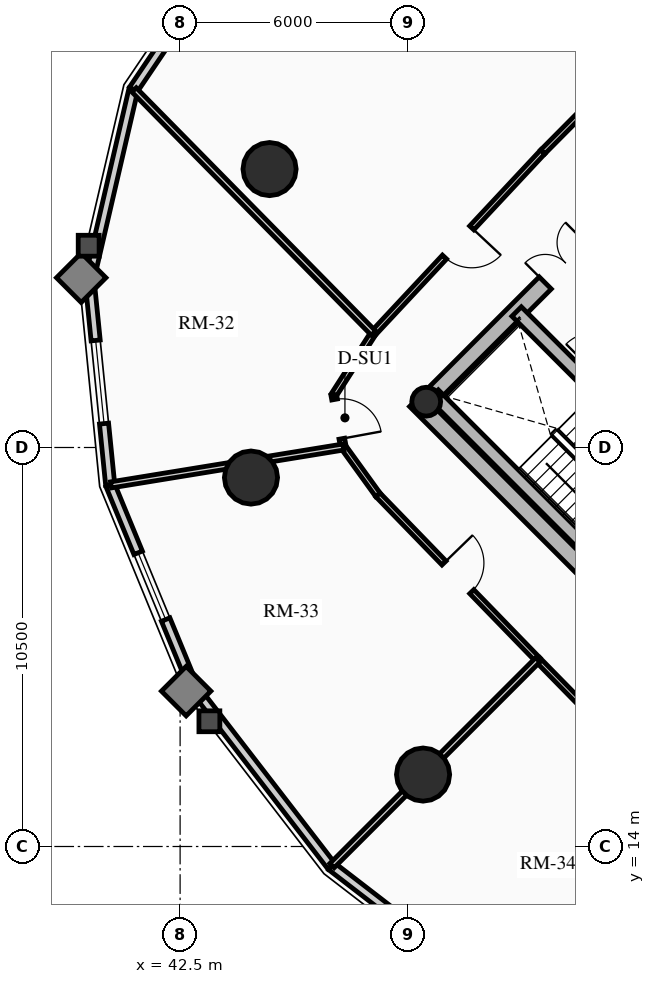
"""IFC4 building model, lengths in metres.
Left out: names, types, materials, properties, quantities, classifications, styles, units other than length and angle.
Written with IfcOpenShell. Run it as: python <this file> out.ifc"""

import sys

from ifc_helpers import new_model, si_unit, direction, frame, frame_2d, origin, origin_2d, place, context, subcontext, project, spatial, rectangle, circle, hollow_circle, extrude, source, transform, mapped, element, fill, save


model = new_model("IFC4")
c1 = context("Model", 3, precision=1e-05, world=origin(), true_north=direction((0.0, 1.0)))
c2 = subcontext(c1, "Body", "Model", "MODEL_VIEW")
j1 = project(units=[si_unit("LENGTHUNIT", "METRE"), si_unit("PLANEANGLEUNIT", "RADIAN")], contexts=[c1])
p1 = place(None, origin())
s1 = spatial("IfcSite", under=j1, at=p1, CompositionType="ELEMENT")
p2 = place(p1, origin())
s2 = spatial("IfcBuilding", under=s1, at=p2, CompositionType="ELEMENT")
p3 = place(p2, frame((0.0, 0.0, 84.7)))
s3 = spatial("IfcBuildingStorey", under=s2, at=p3, CompositionType="ELEMENT", Elevation=84.7)
p4 = place(p3, frame((58.737, 15.697, 0.0), z_axis=(0.0, 0.0, 1.0), x_axis=(-0.707106781187, 0.707106781187, 0.0)))
e1 = element("IfcWall", 1, at=p4, inside=s3, PredefinedType="SHEAR", context=c2, shape_type="SweptSolid", body=[
    extrude(rectangle(XDim=14.2, YDim=0.45, at=frame_2d((7.1, 0.0))), origin(), (0.0, 0.0, 1.0), 2.91),
])
p5 = place(p3, frame((48.856, 25.578, 0.0), z_axis=(0.0, 0.0, 1.0), x_axis=(0.707106781187, 0.707106781187, 0.0)))
e2 = element("IfcWall", 2, at=p5, inside=s3, PredefinedType="SHEAR", context=c2, shape_type="SweptSolid", body=[
    extrude(rectangle(XDim=10.7, YDim=0.45, at=frame_2d((5.35, 0.0))), origin(), (0.0, 0.0, 1.0), 2.91),
])
m1 = source(origin(), c2, "Body", "SweptSolid", [
    extrude(rectangle(XDim=1.5, YDim=2.02, at=frame_2d((0.75, 1.01))), frame((0.0, 0.235, 0.0), z_axis=(0.0, -1.0, 0.0), x_axis=(1.0, 0.0, 0.0)), (0.0, 0.0, 1.0), 0.47),
])
p6 = place(p5, frame((4.6, 0.0, 0.0)))
e3 = element("IfcOpeningElement", 3, at=p6, cuts=e2, PredefinedType="OPENING", context=c2, shape_type="MappedRepresentation", body=[
    mapped(m1, transform((0.0, 0.0, 0.0), x_axis=(1.0, 0.0, 0.0), y_axis=(0.0, 1.0, 0.0), z_axis=(0.0, 0.0, 1.0), scale=1.0)),
])
p7 = place(p3, frame((61.078, 18.355, 0.0), z_axis=(0.0, 0.0, 1.0), x_axis=(-0.707106781187, 0.707106781187, 0.0)))
e4 = element("IfcWall", 4, at=p7, inside=s3, PredefinedType="SHEAR", context=c2, shape_type="SweptSolid", body=[
    extrude(rectangle(XDim=13.75, YDim=0.35, at=frame_2d((6.875, 0.0))), origin(), (0.0, 0.0, 1.0), 2.91),
])
m2 = source(origin(), c2, "Body", "SweptSolid", [
    extrude(rectangle(XDim=1.1, YDim=2.015, at=frame_2d((0.55, 1.007))), frame((0.0, 0.185, 0.0), z_axis=(0.0, -1.0, 0.0), x_axis=(1.0, 0.0, 0.0)), (0.0, 0.0, 1.0), 0.37),
])
p8 = place(p7, frame((4.875, 0.0, 0.0)))
e5 = element("IfcOpeningElement", 5, at=p8, cuts=e4, PredefinedType="OPENING", context=c2, shape_type="MappedRepresentation", body=[
    mapped(m2, transform((0.0, 0.0, 0.0), x_axis=(1.0, 0.0, 0.0), y_axis=(0.0, 1.0, 0.0), z_axis=(0.0, 0.0, 1.0), scale=1.0)),
])
m3 = source(origin(), c2, "Body", "SweptSolid", [
    extrude(rectangle(XDim=1.15, YDim=2.02, at=frame_2d((0.575, 1.01))), frame((0.0, 0.185, 0.0), z_axis=(0.0, -1.0, 0.0), x_axis=(1.0, 0.0, 0.0)), (0.0, 0.0, 1.0), 0.37),
])
p9 = place(p7, frame((7.295, 0.0, 0.0)))
e6 = element("IfcOpeningElement", 6, at=p9, cuts=e4, PredefinedType="OPENING", context=c2, shape_type="MappedRepresentation", body=[
    mapped(m3, transform((0.0, 0.0, 0.0), x_axis=(1.0, 0.0, 0.0), y_axis=(0.0, 1.0, 0.0), z_axis=(0.0, 0.0, 1.0), scale=1.0)),
])
p10 = place(p3, frame((53.922, 21.141, 0.0), z_axis=(0.0, 0.0, 1.0), x_axis=(-0.707088616009, 0.707124945897, 0.0)))
e7 = element("IfcWall", 7, at=p10, inside=s3, PredefinedType="SHEAR", context=c2, shape_type="SweptSolid", body=[
    extrude(rectangle(XDim=6.72, YDim=0.35, at=frame_2d((3.36, 0.0))), origin(), (0.0, 0.0, 1.0), 2.91),
])
p11 = place(p3, frame((48.976, 25.706, 0.0), z_axis=(0.0, 0.0, 1.0), x_axis=(0.707106781187, 0.707106781187, 0.0)))
e8 = element("IfcColumn", 8, at=p11, inside=s3, PredefinedType="COLUMN", context=c2, shape_type="SweptSolid", body=[
    extrude(hollow_circle(Radius=0.38, WallThickness=0.032, at=origin_2d()), origin(), (0.0, 0.0, 1.0), 2.91),
])
for number, where, z_axis, x_axis in (
    (9, (44.854, 31.827, 0.0), (0.0, 0.0, 1.0), (1.0, 0.0, 0.0)),
    (10, (44.365, 23.709, 0.0), (0.0, 0.0, 1.0), (1.0, 0.0, 0.0)),
    (11, (48.893, 15.893, 0.0), (0.0, 0.0, 1.0), (1.0, 0.0, 0.0)),
):
    element("IfcColumn", number, at=place(p3, frame(where, z_axis=z_axis, x_axis=x_axis)), inside=s3, PredefinedType="USERDEFINED", context=c2, shape_type="SweptSolid", body=[
        extrude(circle(Radius=0.7, at=origin_2d()), origin(), (0.0, 0.0, 1.0), 2.91),
    ])
p12 = place(p3, frame((41.271, 33.92, 0.0), z_axis=(0.0, 0.0, 1.0), x_axis=(0.559572880421, 0.828781148131, 0.0)))
e12 = element("IfcWall", 12, at=p12, inside=s3, PredefinedType="SOLIDWALL", context=c2, shape_type="SweptSolid", body=[
    extrude(rectangle(XDim=4.905, YDim=0.24, at=frame_2d((2.452, 0.0))), origin(), (0.0, 0.0, 1.0), 2.179),
])
m4 = source(origin(), c2, "Body", "SweptSolid", [
    extrude(rectangle(XDim=1.9, YDim=1.35, at=frame_2d((0.95, 0.675))), frame((0.0, 0.13, 0.0), z_axis=(0.0, -1.0, 0.0), x_axis=(1.0, 0.0, 0.0)), (0.0, 0.0, 1.0), 0.26),
])
p13 = place(p12, frame((1.502, 0.0, 0.65)))
e13 = element("IfcOpeningElement", 13, at=p13, cuts=e12, PredefinedType="OPENING", context=c2, shape_type="MappedRepresentation", body=[
    mapped(m4, transform((0.0, 0.0, 0.0), x_axis=(1.0, 0.0, 0.0), y_axis=(0.0, 1.0, 0.0), z_axis=(0.0, 0.0, 1.0), scale=1.0)),
])
p14 = place(p3, frame((40.115, 28.933, 0.0), z_axis=(0.0, 0.0, 1.0), x_axis=(0.225834725257, 0.974165631126, 0.0)))
e14 = element("IfcWall", 14, at=p14, inside=s3, PredefinedType="SOLIDWALL", context=c2, shape_type="SweptSolid", body=[
    extrude(rectangle(XDim=5.119, YDim=0.24, at=frame_2d((2.56, 0.0))), origin(), (0.0, 0.0, 1.0), 2.179),
])
p15 = place(p3, frame((40.661, 23.513, 0.0), z_axis=(0.0, 0.0, 1.0), x_axis=(-0.10015591906, 0.994971754311, 0.0)))
e15 = element("IfcWall", 15, at=p15, inside=s3, PredefinedType="SOLIDWALL", context=c2, shape_type="SweptSolid", body=[
    extrude(rectangle(XDim=5.448, YDim=0.24, at=frame_2d((2.724, 0.0))), origin(), (0.0, 0.0, 1.0), 2.179),
])
m5 = source(origin(), c2, "Body", "SweptSolid", [
    extrude(rectangle(XDim=2.2, YDim=1.35, at=frame_2d((1.1, 0.675))), frame((0.0, 0.13, 0.0), z_axis=(0.0, -1.0, 0.0), x_axis=(1.0, 0.0, 0.0)), (0.0, 0.0, 1.0), 0.26),
])
p16 = place(p15, frame((1.624, 0.0, 0.65)))
e16 = element("IfcOpeningElement", 16, at=p16, cuts=e15, PredefinedType="OPENING", context=c2, shape_type="MappedRepresentation", body=[
    mapped(m5, transform((0.0, 0.0, 0.0), x_axis=(1.0, 0.0, 0.0), y_axis=(0.0, 1.0, 0.0), z_axis=(0.0, 0.0, 1.0), scale=1.0)),
])
p17 = place(p3, frame((42.855, 18.189, 0.0), z_axis=(0.0, 0.0, 1.0), x_axis=(-0.381027003055, 0.924563909604, 0.0)))
e17 = element("IfcWall", 17, at=p17, inside=s3, PredefinedType="SOLIDWALL", context=c2, shape_type="SweptSolid", body=[
    extrude(rectangle(XDim=5.758, YDim=0.24, at=frame_2d((2.879, 0.0))), origin(), (0.0, 0.0, 1.0), 2.179),
])
p18 = place(p17, frame((1.929, 0.0, 0.65)))
e18 = element("IfcOpeningElement", 18, at=p18, cuts=e17, PredefinedType="OPENING", context=c2, shape_type="MappedRepresentation", body=[
    mapped(m4, transform((0.0, 0.0, 0.0), x_axis=(1.0, 0.0, 0.0), y_axis=(0.0, 1.0, 0.0), z_axis=(0.0, 0.0, 1.0), scale=1.0)),
])
p19 = place(p3, frame((46.483, 13.483, 0.0), z_axis=(0.0, 0.0, 1.0), x_axis=(-0.61054437102, 0.791982052206, 0.0)))
e19 = element("IfcWall", 19, at=p19, inside=s3, PredefinedType="SOLIDWALL", context=c2, shape_type="SweptSolid", body=[
    extrude(rectangle(XDim=5.942, YDim=0.24, at=frame_2d((2.971, 0.0))), origin(), (0.0, 0.0, 1.0), 2.179),
])
p20 = place(p3, frame((51.189, 9.855, 0.0), z_axis=(0.0, 0.0, 1.0), x_axis=(-0.791982052206, 0.61054437102, 0.0)))
e20 = element("IfcWall", 20, at=p20, inside=s3, PredefinedType="SOLIDWALL", context=c2, shape_type="SweptSolid", body=[
    extrude(rectangle(XDim=5.942, YDim=0.24, at=frame_2d((2.971, 0.0))), origin(), (0.0, 0.0, 1.0), 2.179),
])
p21 = place(p20, frame((1.871, 0.0, 0.65)))
e21 = element("IfcOpeningElement", 21, at=p21, cuts=e20, PredefinedType="OPENING", context=c2, shape_type="MappedRepresentation", body=[
    mapped(m5, transform((0.0, 0.0, 0.0), x_axis=(1.0, 0.0, 0.0), y_axis=(0.0, 1.0, 0.0), z_axis=(0.0, 0.0, 1.0), scale=1.0)),
])
p22 = place(p3, frame((54.427, 34.683, 0.0), z_axis=(0.0, 0.0, 1.0), x_axis=(-0.704178989986, -0.710022499687, 0.0)))
e22 = element("IfcWall", 22, at=p22, inside=s3, PredefinedType="PARTITIONING", context=c2, shape_type="SweptSolid", body=[
    extrude(rectangle(XDim=3.384, YDim=0.15, at=frame_2d((1.692, 0.0))), origin(), (0.0, 0.0, 1.0), 2.225),
])
p23 = place(p3, frame((52.043, 32.28, 0.0), z_axis=(0.0, 0.0, 1.0), x_axis=(-0.682606081633, -0.730786519661, 0.0)))
e23 = element("IfcWall", 23, at=p23, inside=s3, PredefinedType="PARTITIONING", context=c2, shape_type="SweptSolid", body=[
    extrude(rectangle(XDim=6.527, YDim=0.15, at=frame_2d((3.263, 0.0))), origin(), (0.0, 0.0, 1.0), 2.225),
])
m6 = source(origin(), c2, "Body", "SweptSolid", [
    extrude(rectangle(XDim=1.05, YDim=2.015, at=frame_2d((0.525, 1.007))), frame((0.0, 0.085, 0.0), z_axis=(0.0, -1.0, 0.0), x_axis=(1.0, 0.0, 0.0)), (0.0, 0.0, 1.0), 0.17),
])
p24 = place(p23, frame((2.738, 0.0, 0.0)))
e24 = element("IfcOpeningElement", 24, at=p24, cuts=e23, PredefinedType="OPENING", context=c2, shape_type="MappedRepresentation", body=[
    mapped(m6, transform((0.0, 0.0, 0.0), x_axis=(1.0, 0.0, 0.0), y_axis=(0.0, 1.0, 0.0), z_axis=(0.0, 0.0, 1.0), scale=1.0)),
])
p25 = place(p3, frame((47.588, 27.51, 0.0), z_axis=(0.0, 0.0, 1.0), x_axis=(-0.540202619347, -0.841534984449, 0.0)))
e25 = element("IfcWall", 25, at=p25, inside=s3, PredefinedType="PARTITIONING", context=c2, shape_type="SweptSolid", body=[
    extrude(rectangle(XDim=1.935, YDim=0.15, at=frame_2d((0.967, 0.0))), origin(), (0.0, 0.0, 1.0), 2.225),
])
p26 = place(p3, frame((46.543, 25.882, 0.0), z_axis=(0.0, 0.0, 1.0), x_axis=(0.181153502579, -0.983454832976, 0.0)))
e26 = element("IfcWall", 26, at=p26, inside=s3, PredefinedType="PARTITIONING", context=c2, shape_type="SweptSolid", body=[
    extrude(rectangle(XDim=1.392, YDim=0.15, at=frame_2d((0.696, 0.0))), origin(), (0.0, 0.0, 1.0), 2.225),
])
p27 = place(p26, frame((0.12, 0.0, 0.0)))
e27 = element("IfcOpeningElement", 27, at=p27, cuts=e26, PredefinedType="OPENING", context=c2, shape_type="MappedRepresentation", body=[
    mapped(m6, transform((0.0, 0.0, 0.0), x_axis=(1.0, 0.0, 0.0), y_axis=(0.0, 1.0, 0.0), z_axis=(0.0, 0.0, 1.0), scale=1.0)),
])
p28 = place(p3, frame((46.795, 24.513, 0.0), z_axis=(0.0, 0.0, 1.0), x_axis=(0.585628197524, -0.810579801294, 0.0)))
e28 = element("IfcWall", 28, at=p28, inside=s3, PredefinedType="PARTITIONING", context=c2, shape_type="SweptSolid", body=[
    extrude(rectangle(XDim=1.554, YDim=0.15, at=frame_2d((0.777, 0.0))), origin(), (0.0, 0.0, 1.0), 2.225),
])
p29 = place(p3, frame((47.706, 23.253, 0.0), z_axis=(0.0, 0.0, 1.0), x_axis=(0.696179266346, -0.717867974707, 0.0)))
e29 = element("IfcWall", 29, at=p29, inside=s3, PredefinedType="PARTITIONING", context=c2, shape_type="SweptSolid", body=[
    extrude(rectangle(XDim=6.045, YDim=0.15, at=frame_2d((3.022, 0.0))), origin(), (0.0, 0.0, 1.0), 2.655),
])
p30 = place(p29, frame((2.497, 0.0, 0.0)))
e30 = element("IfcOpeningElement", 30, at=p30, cuts=e29, PredefinedType="OPENING", context=c2, shape_type="MappedRepresentation", body=[
    mapped(m6, transform((0.0, 0.0, 0.0), x_axis=(1.0, 0.0, 0.0), y_axis=(0.0, 1.0, 0.0), z_axis=(0.0, 0.0, 1.0), scale=1.0)),
])
p31 = place(p3, frame((51.914, 18.914, 0.0), z_axis=(0.0, 0.0, 1.0), x_axis=(0.699999313799, -0.714143515465, 0.0)))
e31 = element("IfcWall", 31, at=p31, inside=s3, PredefinedType="PARTITIONING", context=c2, shape_type="SweptSolid", body=[
    extrude(rectangle(XDim=6.162, YDim=0.15, at=frame_2d((3.081, 0.0))), origin(), (0.0, 0.0, 1.0), 2.225),
])
p32 = place(p3, frame((54.427, 34.683, 0.0), z_axis=(0.0, 0.0, 1.0), x_axis=(-0.72454072322, 0.689231993161, 0.0)))
e32 = element("IfcWall", 32, at=p32, inside=s3, PredefinedType="PARTITIONING", context=c2, shape_type="SweptSolid", body=[
    extrude(rectangle(XDim=8.747, YDim=0.16, at=frame_2d((4.374, 0.0))), origin(), (0.0, 0.0, 1.0), 2.179),
])
p33 = place(p3, frame((47.588, 27.51, 0.0), z_axis=(0.0, 0.0, 1.0), x_axis=(-0.701457073903, 0.712711704318, 0.0)))
e33 = element("IfcWall", 33, at=p33, inside=s3, PredefinedType="PARTITIONING", context=c2, shape_type="SweptSolid", body=[
    extrude(rectangle(XDim=8.981, YDim=0.16, at=frame_2d((4.49, 0.0))), origin(), (0.0, 0.0, 1.0), 2.179),
])
p34 = place(p3, frame((46.795, 24.513, 0.0), z_axis=(0.0, 0.0, 1.0), x_axis=(-0.986966109862, -0.160928238618, 0.0)))
e34 = element("IfcWall", 34, at=p34, inside=s3, PredefinedType="PARTITIONING", context=c2, shape_type="SweptSolid", body=[
    extrude(rectangle(XDim=6.196, YDim=0.16, at=frame_2d((3.098, 0.0))), origin(), (0.0, 0.0, 1.0), 2.179),
])
p35 = place(p3, frame((51.914, 18.914, 0.0), z_axis=(0.0, 0.0, 1.0), x_axis=(-0.707106781187, -0.707106781187, 0.0)))
e35 = element("IfcWall", 35, at=p35, inside=s3, PredefinedType="PARTITIONING", context=c2, shape_type="SweptSolid", body=[
    extrude(rectangle(XDim=7.661, YDim=0.16, at=frame_2d((3.831, 0.0))), origin(), (0.0, 0.0, 1.0), 2.179),
])
m7 = source(origin(), c2, "Body", "SweptSolid", [
    extrude(rectangle(XDim=2.2, YDim=1.35, at=frame_2d((1.1, 0.675))), frame((0.0, 0.03, 0.0), z_axis=(0.0, -1.0, 0.0), x_axis=(1.0, 0.0, 0.0)), (0.0, 0.0, 1.0), 0.06),
])
p36 = place(p16, origin())
e36 = element("IfcWindow", 36, at=p36, inside=s3, PartitioningType="DOUBLE_PANEL_VERTICAL", PredefinedType="WINDOW", context=c2, shape_type="MappedRepresentation", body=[
    mapped(m7, transform((0.0, 0.0, 0.0), x_axis=(1.0, 0.0, 0.0), y_axis=(0.0, 1.0, 0.0), z_axis=(0.0, 0.0, 1.0), scale=1.0)),
])
fill(e16, e36)
m8 = source(origin(), c2, "Body", "SweptSolid", [
    extrude(rectangle(XDim=1.9, YDim=1.35, at=frame_2d((0.95, 0.675))), frame((0.0, 0.03, 0.0), z_axis=(0.0, -1.0, 0.0), x_axis=(1.0, 0.0, 0.0)), (0.0, 0.0, 1.0), 0.06),
])
p37 = place(p18, origin())
e37 = element("IfcWindow", 37, at=p37, inside=s3, PartitioningType="DOUBLE_PANEL_VERTICAL", PredefinedType="WINDOW", context=c2, shape_type="MappedRepresentation", body=[
    mapped(m8, transform((0.0, 0.0, 0.0), x_axis=(1.0, 0.0, 0.0), y_axis=(0.0, 1.0, 0.0), z_axis=(0.0, 0.0, 1.0), scale=1.0)),
])
fill(e18, e37)
m9 = source(origin(), c2, "Body", "SweptSolid", [
    extrude(rectangle(XDim=1.5, YDim=2.02, at=frame_2d((0.75, 1.01))), frame((0.0, 0.025, 0.0), z_axis=(0.0, -1.0, 0.0), x_axis=(1.0, 0.0, 0.0)), (0.0, 0.0, 1.0), 0.05),
])
p38 = place(p6, origin())
e38 = element("IfcDoor", 38, at=p38, inside=s3, OperationType="DOUBLE_DOOR_SINGLE_SWING", PredefinedType="DOOR", context=c2, shape_type="MappedRepresentation", body=[
    mapped(m9, transform((0.0, 0.0, 0.0), x_axis=(1.0, 0.0, 0.0), y_axis=(0.0, 1.0, 0.0), z_axis=(0.0, 0.0, 1.0), scale=1.0)),
])
fill(e3, e38)
m10 = source(origin(), c2, "Body", "SweptSolid", [
    extrude(rectangle(XDim=1.05, YDim=2.015, at=frame_2d((0.525, 1.007))), frame((0.0, 0.025, 0.0), z_axis=(0.0, -1.0, 0.0), x_axis=(1.0, 0.0, 0.0)), (0.0, 0.0, 1.0), 0.05),
])
p39 = place(p24, origin())
e39 = element("IfcDoor", 39, at=p39, inside=s3, OperationType="SINGLE_SWING_LEFT", PredefinedType="DOOR", context=c2, shape_type="MappedRepresentation", body=[
    mapped(m10, transform((0.0, 0.0, 0.0), x_axis=(1.0, 0.0, 0.0), y_axis=(0.0, 1.0, 0.0), z_axis=(0.0, 0.0, 1.0), scale=1.0)),
])
fill(e24, e39)
p40 = place(p27, origin())
e40 = element("IfcDoor", 40, at=p40, inside=s3, OperationType="SINGLE_SWING_RIGHT", PredefinedType="DOOR", context=c2, shape_type="MappedRepresentation", body=[
    mapped(m10, transform((0.0, 0.0, 0.0), x_axis=(1.0, 0.0, 0.0), y_axis=(0.0, 1.0, 0.0), z_axis=(0.0, 0.0, 1.0), scale=1.0)),
])
fill(e27, e40)
p41 = place(p30, origin())
e41 = element("IfcDoor", 41, at=p41, inside=s3, OperationType="SINGLE_SWING_LEFT", PredefinedType="DOOR", context=c2, shape_type="MappedRepresentation", body=[
    mapped(m10, transform((0.0, 0.0, 0.0), x_axis=(1.0, 0.0, 0.0), y_axis=(0.0, 1.0, 0.0), z_axis=(0.0, 0.0, 1.0), scale=1.0)),
])
fill(e30, e41)
save(model, sys.argv[1])
